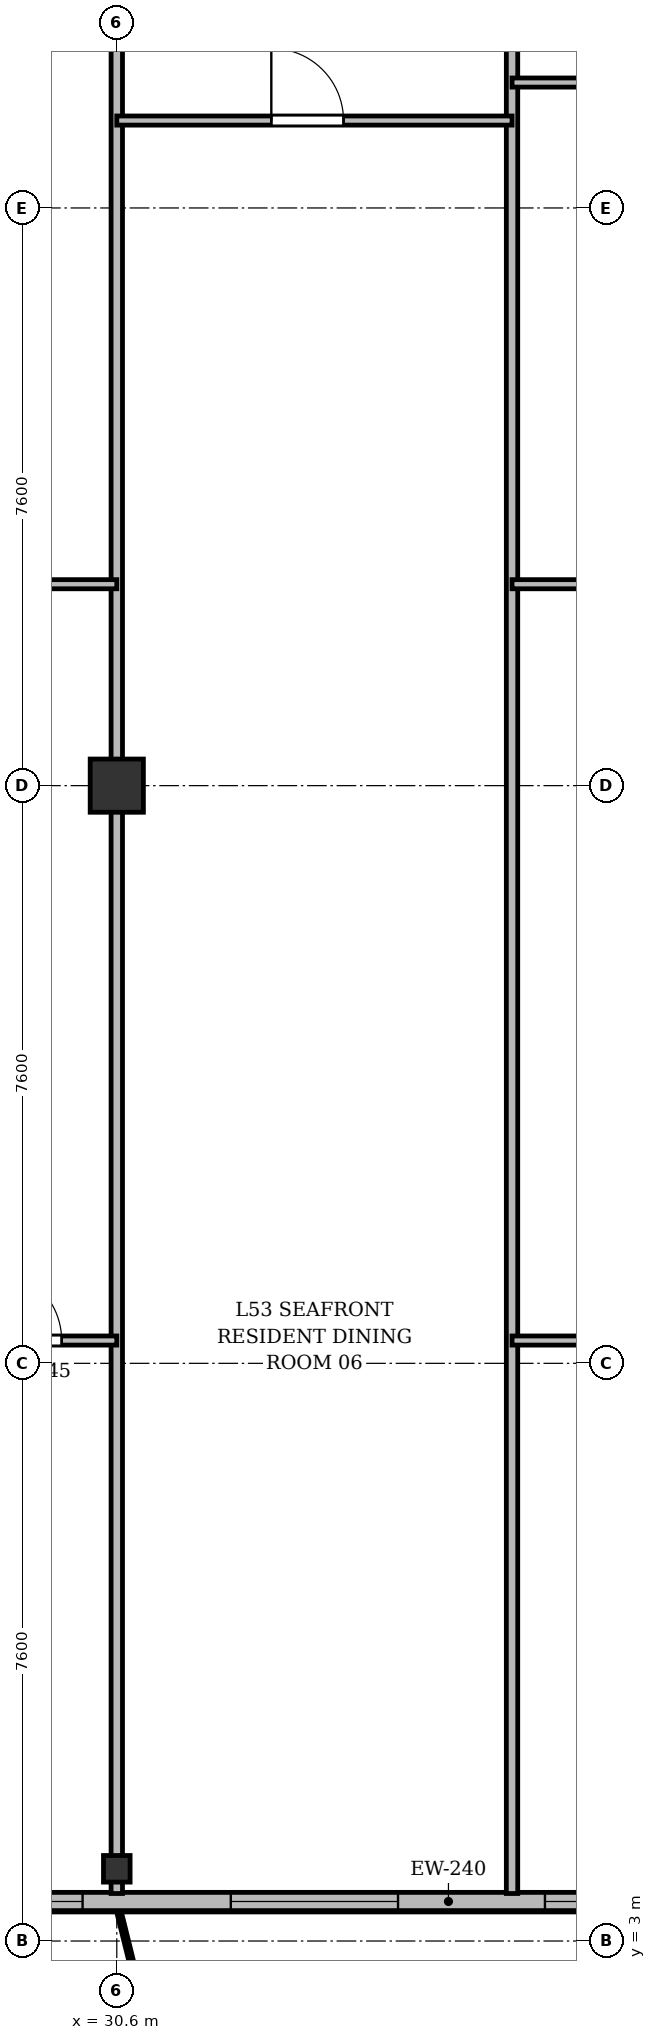
"""IFC4 building model, lengths in metres.
Left out: names, types, materials, properties, quantities, classifications, styles, units other than length and angle.
Written with IfcOpenShell. Run it as: python <this file> out.ifc"""

import sys

from ifc_helpers import new_model, si_unit, direction, frame, frame_2d, origin, origin_2d, place, context, subcontext, project, spatial, rectangle, i_section, extrude, source, transform, mapped, element, fill, save


model = new_model("IFC4")
c1 = context("Model", 3, precision=1e-05, world=origin(), true_north=direction((0.0, 1.0)))
c2 = subcontext(c1, "Body", "Model", "MODEL_VIEW")
j1 = project(units=[si_unit("LENGTHUNIT", "METRE"), si_unit("PLANEANGLEUNIT", "RADIAN")], contexts=[c1])
p1 = place(None, origin())
s1 = spatial("IfcSite", under=j1, at=p1, CompositionType="ELEMENT")
p2 = place(p1, origin())
s2 = spatial("IfcBuilding", under=s1, at=p2, CompositionType="ELEMENT")
p3 = place(p2, frame((0.0, 0.0, 204.9)))
s3 = spatial("IfcBuildingStorey", under=s2, at=p3, CompositionType="ELEMENT", Elevation=204.9)
m1 = source(origin(), c2, "Body", "SweptSolid", [
    extrude(i_section(OverallWidth=0.35, OverallDepth=0.35, WebThickness=0.018, FlangeThickness=0.028, at=origin_2d()), origin(), (0.0, 0.0, 1.0), 3.6),
])
p4 = place(p3, frame((30.6, 3.95, 0.0), z_axis=(0.0, 0.0, 1.0), x_axis=(1.0, 0.0, 0.0)))
e1 = element("IfcColumn", 1, at=p4, inside=s3, PredefinedType="COLUMN", context=c2, shape_type="MappedRepresentation", body=[
    mapped(m1, transform((0.0, 0.0, 0.0), x_axis=(1.0, 0.0, 0.0), y_axis=(0.0, 1.0, 0.0), z_axis=(0.0, 0.0, 1.0), scale=1.0)),
])
m2 = source(origin(), c2, "Body", "SweptSolid", [
    extrude(rectangle(XDim=0.7, YDim=0.7, at=origin_2d()), origin(), (0.0, 0.0, 1.0), 3.6),
])
p5 = place(p3, frame((30.6, 18.2, 0.0), z_axis=(0.0, 0.0, 1.0), x_axis=(1.0, 0.0, 0.0)))
e2 = element("IfcColumn", 2, at=p5, inside=s3, PredefinedType="COLUMN", context=c2, shape_type="MappedRepresentation", body=[
    mapped(m2, transform((0.0, 0.0, 0.0), x_axis=(1.0, 0.0, 0.0), y_axis=(0.0, 1.0, 0.0), z_axis=(0.0, 0.0, 1.0), scale=1.0)),
])
p6 = place(p3, frame((63.4, 3.52, 0.0), z_axis=(0.0, 0.0, 1.0), x_axis=(-1.0, 0.0, 0.0)))
e3 = element("IfcWall", 3, at=p6, inside=s3, PredefinedType="SOLIDWALL", context=c2, shape_type="SweptSolid", body=[
    extrude(rectangle(XDim=52.4, YDim=0.24, at=frame_2d((26.2, 0.0))), origin(), (0.0, 0.0, 1.0), 3.36),
])
p7 = place(p6, frame((1.345, 0.0, 0.9)))
e4 = element("IfcOpeningElement", 4, at=p7, cuts=e3, PredefinedType="OPENING", context=c2, shape_type="SweptSolid", body=[
    extrude(rectangle(XDim=2.0, YDim=1.95, at=frame_2d((1.0, 0.975))), frame((0.0, 0.13, 0.0), z_axis=(0.0, -1.0, 0.0), x_axis=(1.0, 0.0, 0.0)), (0.0, 0.0, 1.0), 0.26),
])
p8 = place(p6, frame((5.075, 0.0, 0.9)))
e5 = element("IfcOpeningElement", 5, at=p8, cuts=e3, PredefinedType="OPENING", context=c2, shape_type="SweptSolid", body=[
    extrude(rectangle(XDim=1.65, YDim=1.85, at=frame_2d((0.825, 0.925))), frame((0.0, 0.13, 0.0), z_axis=(0.0, -1.0, 0.0), x_axis=(1.0, 0.0, 0.0)), (0.0, 0.0, 1.0), 0.26),
])
p9 = place(p6, frame((7.45, 0.0, 0.9)))
e6 = element("IfcOpeningElement", 6, at=p9, cuts=e3, PredefinedType="OPENING", context=c2, shape_type="SweptSolid", body=[
    extrude(rectangle(XDim=1.5, YDim=1.75, at=frame_2d((0.75, 0.875))), frame((0.0, 0.13, 0.0), z_axis=(0.0, -1.0, 0.0), x_axis=(1.0, 0.0, 0.0)), (0.0, 0.0, 1.0), 0.26),
])
p10 = place(p6, frame((9.7, 0.0, 0.9)))
e7 = element("IfcOpeningElement", 7, at=p10, cuts=e3, PredefinedType="OPENING", context=c2, shape_type="SweptSolid", body=[
    extrude(rectangle(XDim=2.2, YDim=1.8, at=frame_2d((1.1, 0.9))), frame((0.0, 0.13, 0.0), z_axis=(0.0, -1.0, 0.0), x_axis=(1.0, 0.0, 0.0)), (0.0, 0.0, 1.0), 0.26),
])
p11 = place(p6, frame((14.217, 0.0, 0.0)))
e8 = element("IfcOpeningElement", 8, at=p11, cuts=e3, PredefinedType="OPENING", context=c2, shape_type="SweptSolid", body=[
    extrude(rectangle(XDim=1.2, YDim=2.2, at=frame_2d((0.6, 1.1))), frame((0.0, 0.13, 0.0), z_axis=(0.0, -1.0, 0.0), x_axis=(1.0, 0.0, 0.0)), (0.0, 0.0, 1.0), 0.26),
])
p12 = place(p6, frame((19.934, 0.0, 0.9)))
e9 = element("IfcOpeningElement", 9, at=p12, cuts=e3, PredefinedType="OPENING", context=c2, shape_type="SweptSolid", body=[
    extrude(rectangle(XDim=2.0, YDim=1.95, at=frame_2d((1.0, 0.975))), frame((0.0, 0.13, 0.0), z_axis=(0.0, -1.0, 0.0), x_axis=(1.0, 0.0, 0.0)), (0.0, 0.0, 1.0), 0.26),
])
p13 = place(p6, frame((22.775, 0.0, 0.9)))
e10 = element("IfcOpeningElement", 10, at=p13, cuts=e3, PredefinedType="OPENING", context=c2, shape_type="SweptSolid", body=[
    extrude(rectangle(XDim=1.65, YDim=1.85, at=frame_2d((0.825, 0.925))), frame((0.0, 0.13, 0.0), z_axis=(0.0, -1.0, 0.0), x_axis=(1.0, 0.0, 0.0)), (0.0, 0.0, 1.0), 0.26),
])
p14 = place(p6, frame((25.367, 0.0, 0.9)))
e11 = element("IfcOpeningElement", 11, at=p14, cuts=e3, PredefinedType="OPENING", context=c2, shape_type="SweptSolid", body=[
    extrude(rectangle(XDim=1.8, YDim=1.8, at=frame_2d((0.9, 0.9))), frame((0.0, 0.13, 0.0), z_axis=(0.0, -1.0, 0.0), x_axis=(1.0, 0.0, 0.0)), (0.0, 0.0, 1.0), 0.26),
])
p15 = place(p6, frame((29.1, 0.0, 0.9)))
e12 = element("IfcOpeningElement", 12, at=p15, cuts=e3, PredefinedType="OPENING", context=c2, shape_type="SweptSolid", body=[
    extrude(rectangle(XDim=2.2, YDim=1.8, at=frame_2d((1.1, 0.9))), frame((0.0, 0.13, 0.0), z_axis=(0.0, -1.0, 0.0), x_axis=(1.0, 0.0, 0.0)), (0.0, 0.0, 1.0), 0.26),
])
p16 = place(p6, frame((33.25, 0.0, 0.9)))
e13 = element("IfcOpeningElement", 13, at=p16, cuts=e3, PredefinedType="OPENING", context=c2, shape_type="SweptSolid", body=[
    extrude(rectangle(XDim=1.5, YDim=1.75, at=frame_2d((0.75, 0.875))), frame((0.0, 0.13, 0.0), z_axis=(0.0, -1.0, 0.0), x_axis=(1.0, 0.0, 0.0)), (0.0, 0.0, 1.0), 0.26),
])
p17 = place(p6, frame((35.65, 0.0, 0.9)))
e14 = element("IfcOpeningElement", 14, at=p17, cuts=e3, PredefinedType="OPENING", context=c2, shape_type="SweptSolid", body=[
    extrude(rectangle(XDim=1.5, YDim=1.75, at=frame_2d((0.75, 0.875))), frame((0.0, 0.13, 0.0), z_axis=(0.0, -1.0, 0.0), x_axis=(1.0, 0.0, 0.0)), (0.0, 0.0, 1.0), 0.26),
])
p18 = place(p6, frame((37.975, 0.0, 0.9)))
e15 = element("IfcOpeningElement", 15, at=p18, cuts=e3, PredefinedType="OPENING", context=c2, shape_type="SweptSolid", body=[
    extrude(rectangle(XDim=1.65, YDim=1.85, at=frame_2d((0.825, 0.925))), frame((0.0, 0.13, 0.0), z_axis=(0.0, -1.0, 0.0), x_axis=(1.0, 0.0, 0.0)), (0.0, 0.0, 1.0), 0.26),
])
p19 = place(p6, frame((41.456, 0.0, 0.0)))
e16 = element("IfcOpeningElement", 16, at=p19, cuts=e3, PredefinedType="OPENING", context=c2, shape_type="SweptSolid", body=[
    extrude(rectangle(XDim=1.2, YDim=2.2, at=frame_2d((0.6, 1.1))), frame((0.0, 0.13, 0.0), z_axis=(0.0, -1.0, 0.0), x_axis=(1.0, 0.0, 0.0)), (0.0, 0.0, 1.0), 0.26),
])
p20 = place(p6, frame((43.45, 0.0, 0.9)))
e17 = element("IfcOpeningElement", 17, at=p20, cuts=e3, PredefinedType="OPENING", context=c2, shape_type="SweptSolid", body=[
    extrude(rectangle(XDim=1.5, YDim=1.75, at=frame_2d((0.75, 0.875))), frame((0.0, 0.13, 0.0), z_axis=(0.0, -1.0, 0.0), x_axis=(1.0, 0.0, 0.0)), (0.0, 0.0, 1.0), 0.26),
])
p21 = place(p6, frame((45.75, 0.0, 0.9)))
e18 = element("IfcOpeningElement", 18, at=p21, cuts=e3, PredefinedType="OPENING", context=c2, shape_type="SweptSolid", body=[
    extrude(rectangle(XDim=1.5, YDim=1.75, at=frame_2d((0.75, 0.875))), frame((0.0, 0.13, 0.0), z_axis=(0.0, -1.0, 0.0), x_axis=(1.0, 0.0, 0.0)), (0.0, 0.0, 1.0), 0.26),
])
p22 = place(p6, frame((49.055, 0.0, 0.9)))
e19 = element("IfcOpeningElement", 19, at=p22, cuts=e3, PredefinedType="OPENING", context=c2, shape_type="SweptSolid", body=[
    extrude(rectangle(XDim=2.0, YDim=1.95, at=frame_2d((1.0, 0.975))), frame((0.0, 0.13, 0.0), z_axis=(0.0, -1.0, 0.0), x_axis=(1.0, 0.0, 0.0)), (0.0, 0.0, 1.0), 0.26),
])
p23 = place(p3, frame((30.6, 3.625, 0.0), z_axis=(0.0, 0.0, 1.0), x_axis=(0.0, 1.0, 0.0)))
e20 = element("IfcWall", 20, at=p23, inside=s3, PredefinedType="PARTITIONING", context=c2, shape_type="SweptSolid", body=[
    extrude(rectangle(XDim=27.175, YDim=0.15, at=frame_2d((13.587, 0.0))), origin(), (0.0, 0.0, 1.0), 2.86),
])
p24 = place(p3, frame((35.8, 3.625, 0.0), z_axis=(0.0, 0.0, 1.0), x_axis=(0.0, 1.0, 0.0)))
e21 = element("IfcWall", 21, at=p24, inside=s3, PredefinedType="PARTITIONING", context=c2, shape_type="SweptSolid", body=[
    extrude(rectangle(XDim=27.175, YDim=0.15, at=frame_2d((13.587, 0.0))), origin(), (0.0, 0.0, 1.0), 2.91),
])
p25 = place(p3, frame((23.4, 20.85, 0.0), z_axis=(0.0, 0.0, 1.0), x_axis=(1.0, 0.0, 0.0)))
e22 = element("IfcWall", 22, at=p25, inside=s3, PredefinedType="PARTITIONING", context=c2, shape_type="SweptSolid", body=[
    extrude(rectangle(XDim=7.2, YDim=0.12, at=frame_2d((3.6, 0.0))), origin(), (0.0, 0.0, 1.0), 2.86),
])
p26 = place(p25, frame((3.125, 0.0, 0.0)))
e23 = element("IfcOpeningElement", 23, at=p26, cuts=e22, PredefinedType="OPENING", context=c2, shape_type="SweptSolid", body=[
    extrude(rectangle(XDim=0.95, YDim=2.15, at=frame_2d((0.475, 1.075))), frame((0.0, 0.07, 0.0), z_axis=(0.0, -1.0, 0.0), x_axis=(1.0, 0.0, 0.0)), (0.0, 0.0, 1.0), 0.14),
])
p27 = place(p3, frame((28.2, 10.9, 0.0), z_axis=(0.0, 0.0, 1.0), x_axis=(1.0, 0.0, 0.0)))
e24 = element("IfcWall", 24, at=p27, inside=s3, PredefinedType="PARTITIONING", context=c2, shape_type="SweptSolid", body=[
    extrude(rectangle(XDim=2.4, YDim=0.12, at=frame_2d((1.2, 0.0))), origin(), (0.0, 0.0, 1.0), 2.86),
])
p28 = place(p27, frame((0.725, 0.0, 0.0)))
e25 = element("IfcOpeningElement", 25, at=p28, cuts=e24, PredefinedType="OPENING", context=c2, shape_type="SweptSolid", body=[
    extrude(rectangle(XDim=0.95, YDim=2.15, at=frame_2d((0.475, 1.075))), frame((0.0, 0.07, 0.0), z_axis=(0.0, -1.0, 0.0), x_axis=(1.0, 0.0, 0.0)), (0.0, 0.0, 1.0), 0.14),
])
p29 = place(p3, frame((30.6, 26.95, 0.0), z_axis=(0.0, 0.0, 1.0), x_axis=(1.0, 0.0, 0.0)))
e26 = element("IfcWall", 26, at=p29, inside=s3, PredefinedType="PARTITIONING", context=c2, shape_type="SweptSolid", body=[
    extrude(rectangle(XDim=5.2, YDim=0.12, at=frame_2d((2.6, 0.0))), origin(), (0.0, 0.0, 1.0), 2.86),
])
p30 = place(p29, frame((2.033, 0.0, 0.0)))
e27 = element("IfcOpeningElement", 27, at=p30, cuts=e26, PredefinedType="OPENING", context=c2, shape_type="SweptSolid", body=[
    extrude(rectangle(XDim=0.95, YDim=2.15, at=frame_2d((0.475, 1.075))), frame((0.0, 0.07, 0.0), z_axis=(0.0, -1.0, 0.0), x_axis=(1.0, 0.0, 0.0)), (0.0, 0.0, 1.0), 0.14),
])
p31 = place(p3, frame((35.8, 20.85, 0.0), z_axis=(0.0, 0.0, 1.0), x_axis=(1.0, 0.0, 0.0)))
e28 = element("IfcWall", 28, at=p31, inside=s3, PredefinedType="PARTITIONING", context=c2, shape_type="SweptSolid", body=[
    extrude(rectangle(XDim=8.0, YDim=0.12, at=frame_2d((4.0, 0.0))), origin(), (0.0, 0.0, 1.0), 2.86),
])
p32 = place(p31, frame((3.525, 0.0, 0.0)))
e29 = element("IfcOpeningElement", 29, at=p32, cuts=e28, PredefinedType="OPENING", context=c2, shape_type="SweptSolid", body=[
    extrude(rectangle(XDim=0.95, YDim=2.15, at=frame_2d((0.475, 1.075))), frame((0.0, 0.07, 0.0), z_axis=(0.0, -1.0, 0.0), x_axis=(1.0, 0.0, 0.0)), (0.0, 0.0, 1.0), 0.14),
])
p33 = place(p3, frame((35.8, 27.45, 0.0), z_axis=(0.0, 0.0, 1.0), x_axis=(1.0, 0.0, 0.0)))
e30 = element("IfcWall", 30, at=p33, inside=s3, PredefinedType="PARTITIONING", context=c2, shape_type="SweptSolid", body=[
    extrude(rectangle(XDim=2.4, YDim=0.12, at=frame_2d((1.2, 0.0))), origin(), (0.0, 0.0, 1.0), 3.36),
])
p34 = place(p3, frame((35.8, 10.9, 0.0), z_axis=(0.0, 0.0, 1.0), x_axis=(1.0, 0.0, 0.0)))
e31 = element("IfcWall", 31, at=p34, inside=s3, PredefinedType="PARTITIONING", context=c2, shape_type="SweptSolid", body=[
    extrude(rectangle(XDim=2.667, YDim=0.12, at=frame_2d((1.333, 0.0))), origin(), (0.0, 0.0, 1.0), 3.36),
])
p35 = place(p34, frame((0.859, 0.0, 0.0)))
e32 = element("IfcOpeningElement", 32, at=p35, cuts=e31, PredefinedType="OPENING", context=c2, shape_type="SweptSolid", body=[
    extrude(rectangle(XDim=0.95, YDim=2.15, at=frame_2d((0.475, 1.075))), frame((0.0, 0.07, 0.0), z_axis=(0.0, -1.0, 0.0), x_axis=(1.0, 0.0, 0.0)), (0.0, 0.0, 1.0), 0.14),
])
m3 = source(origin(), c2, "Body", "SweptSolid", [
    extrude(rectangle(XDim=1.8, YDim=1.8, at=frame_2d((0.9, 0.9))), frame((0.0, 0.03, 0.0), z_axis=(0.0, -1.0, 0.0), x_axis=(1.0, 0.0, 0.0)), (0.0, 0.0, 1.0), 0.06),
])
p36 = place(p14, origin())
e33 = element("IfcWindow", 33, at=p36, inside=s3, PartitioningType="SINGLE_PANEL", PredefinedType="WINDOW", context=c2, shape_type="MappedRepresentation", body=[
    mapped(m3, transform((0.0, 0.0, 0.0), x_axis=(1.0, 0.0, 0.0), y_axis=(0.0, 1.0, 0.0), z_axis=(0.0, 0.0, 1.0), scale=1.0)),
])
fill(e11, e33)
m4 = source(origin(), c2, "Body", "SweptSolid", [
    extrude(rectangle(XDim=2.2, YDim=1.8, at=frame_2d((1.1, 0.9))), frame((0.0, 0.03, 0.0), z_axis=(0.0, -1.0, 0.0), x_axis=(1.0, 0.0, 0.0)), (0.0, 0.0, 1.0), 0.06),
])
p37 = place(p15, origin())
e34 = element("IfcWindow", 34, at=p37, inside=s3, PartitioningType="SINGLE_PANEL", PredefinedType="WINDOW", context=c2, shape_type="MappedRepresentation", body=[
    mapped(m4, transform((0.0, 0.0, 0.0), x_axis=(1.0, 0.0, 0.0), y_axis=(0.0, 1.0, 0.0), z_axis=(0.0, 0.0, 1.0), scale=1.0)),
])
fill(e12, e34)
m5 = source(origin(), c2, "Body", "SweptSolid", [
    extrude(rectangle(XDim=1.5, YDim=1.75, at=frame_2d((0.75, 0.875))), frame((0.0, 0.03, 0.0), z_axis=(0.0, -1.0, 0.0), x_axis=(1.0, 0.0, 0.0)), (0.0, 0.0, 1.0), 0.06),
])
p38 = place(p16, origin())
e35 = element("IfcWindow", 35, at=p38, inside=s3, PartitioningType="SINGLE_PANEL", PredefinedType="WINDOW", context=c2, shape_type="MappedRepresentation", body=[
    mapped(m5, transform((0.0, 0.0, 0.0), x_axis=(1.0, 0.0, 0.0), y_axis=(0.0, 1.0, 0.0), z_axis=(0.0, 0.0, 1.0), scale=1.0)),
])
fill(e13, e35)
m6 = source(origin(), c2, "Body", "SweptSolid", [
    extrude(rectangle(XDim=0.95, YDim=2.15, at=frame_2d((0.475, 1.075))), frame((0.0, 0.025, 0.0), z_axis=(0.0, -1.0, 0.0), x_axis=(1.0, 0.0, 0.0)), (0.0, 0.0, 1.0), 0.05),
])
p39 = place(p28, origin())
e36 = element("IfcDoor", 36, at=p39, inside=s3, OperationType="SINGLE_SWING_LEFT", PredefinedType="DOOR", context=c2, shape_type="MappedRepresentation", body=[
    mapped(m6, transform((0.0, 0.0, 0.0), x_axis=(1.0, 0.0, 0.0), y_axis=(0.0, 1.0, 0.0), z_axis=(0.0, 0.0, 1.0), scale=1.0)),
])
fill(e25, e36)
p40 = place(p30, origin())
e37 = element("IfcDoor", 37, at=p40, inside=s3, OperationType="SINGLE_SWING_LEFT", PredefinedType="DOOR", context=c2, shape_type="MappedRepresentation", body=[
    mapped(m6, transform((0.0, 0.0, 0.0), x_axis=(1.0, 0.0, 0.0), y_axis=(0.0, 1.0, 0.0), z_axis=(0.0, 0.0, 1.0), scale=1.0)),
])
fill(e27, e37)
save(model, sys.argv[1])
